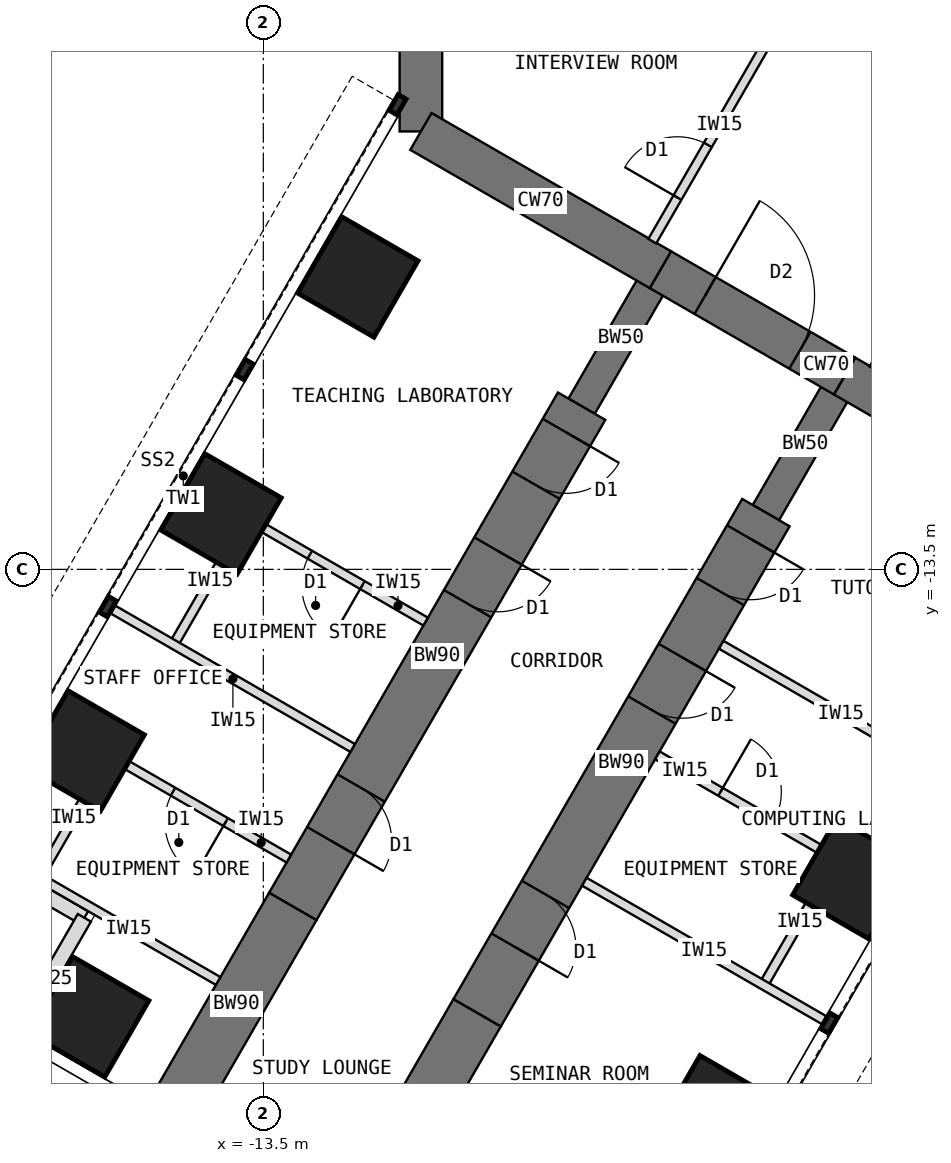
"""IFC4 building model, lengths in metres.
Left out: names, types, materials, properties, quantities, classifications, styles, units other than length and angle.
Written with IfcOpenShell. Run it as: python <this file> out.ifc"""

import sys

from ifc_helpers import new_model, si_unit, direction, frame, frame_2d, origin, origin_2d, place, context, subcontext, project, spatial, rectangle, extrude, element, fill, save


model = new_model("IFC4")
c1 = context("Model", 3, precision=1e-05, world=origin(), true_north=direction((0.0, 1.0)))
c2 = subcontext(c1, "Body", "Model", "MODEL_VIEW")
j1 = project(units=[si_unit("LENGTHUNIT", "METRE"), si_unit("PLANEANGLEUNIT", "RADIAN")], contexts=[c1])
p1 = place(None, origin())
s1 = spatial("IfcSite", under=j1, at=p1, CompositionType="ELEMENT")
p2 = place(p1, origin())
s2 = spatial("IfcBuilding", under=s1, at=p2, CompositionType="ELEMENT")
p3 = place(p2, frame((0.0, 0.0, 60.5)))
s3 = spatial("IfcBuildingStorey", under=s2, at=p3, CompositionType="ELEMENT", Elevation=60.5)
p4 = place(p3, frame((-10.908, 6.298, 0.0), z_axis=(0.0, 0.0, 1.0), x_axis=(0.0, -1.0, 0.0)))
e1 = element("IfcWall", 1, at=p4, inside=s3, PredefinedType="SHEAR", context=c2, shape_type="SweptSolid", body=[
    extrude(rectangle(XDim=12.596, YDim=0.7, at=frame_2d((6.298, 0.0))), origin(), (0.0, 0.0, 1.0), 4.0),
])
p5 = place(p3, frame((-10.908, -6.298, 0.0), z_axis=(0.0, 0.0, 1.0), x_axis=(0.866034513004, -0.499984222037, 0.0)))
e2 = element("IfcWall", 2, at=p5, inside=s3, PredefinedType="SHEAR", context=c2, shape_type="SweptSolid", body=[
    extrude(rectangle(XDim=4.548, YDim=0.7, at=frame_2d((2.274, 0.0))), origin(), (0.0, 0.0, 1.0), 4.0),
])
p6 = place(p3, frame((-6.97, -8.572, 0.0), z_axis=(0.0, 0.0, 1.0), x_axis=(0.866019471182, -0.500010275428, 0.0)))
e3 = element("IfcWall", 3, at=p6, inside=s3, PredefinedType="SHEAR", context=c2, shape_type="SweptSolid", body=[
    extrude(rectangle(XDim=3.5, YDim=0.7, at=frame_2d((1.75, 0.0))), origin(), (0.0, 0.0, 1.0), 4.0),
])
p7 = place(p6, frame((0.85, 0.0, 0.0)))
e4 = element("IfcOpeningElement", 4, at=p7, cuts=e3, PredefinedType="OPENING", context=c2, shape_type="SweptSolid", body=[
    extrude(rectangle(XDim=1.8, YDim=2.1, at=frame_2d((0.9, 1.05))), frame((0.0, 0.36, 0.0), z_axis=(0.0, -1.0, 0.0), x_axis=(1.0, 0.0, 0.0)), (0.0, 0.0, 1.0), 0.72),
])
p8 = place(p3, frame((-3.939, -10.322, 0.0), z_axis=(0.0, 0.0, 1.0), x_axis=(0.866011268655, -0.500024481964, 0.0)))
e5 = element("IfcWall", 5, at=p8, inside=s3, PredefinedType="SHEAR", context=c2, shape_type="SweptSolid", body=[
    extrude(rectangle(XDim=4.548, YDim=0.7, at=frame_2d((2.274, 0.0))), origin(), (0.0, 0.0, 1.0), 4.0),
])
p9 = place(p3, frame((-3.939, -10.322, 0.0), z_axis=(0.0, 0.0, 1.0), x_axis=(-0.499918158782, -0.866072649678, 0.0)))
e6 = element("IfcWall", 6, at=p9, inside=s3, PredefinedType="SHEAR", context=c2, shape_type="SweptSolid", body=[
    extrude(rectangle(XDim=2.592, YDim=0.5, at=frame_2d((1.296, 0.0))), origin(), (0.0, 0.0, 1.0), 4.0),
])
p10 = place(p3, frame((-5.234, -12.566, 0.0), z_axis=(0.0, 0.0, 1.0), x_axis=(-0.499997557548, -0.86602681393, 0.0)))
e7 = element("IfcWall", 7, at=p10, inside=s3, PredefinedType="SHEAR", context=c2, shape_type="SweptSolid", body=[
    extrude(rectangle(XDim=9.5, YDim=0.9, at=frame_2d((4.75, 0.0))), origin(), (0.0, 0.0, 1.0), 4.0),
])
p11 = place(p10, frame((0.5, 0.0, 0.0)))
e8 = element("IfcOpeningElement", 8, at=p11, cuts=e7, PredefinedType="OPENING", context=c2, shape_type="SweptSolid", body=[
    extrude(rectangle(XDim=1.0, YDim=2.1, at=frame_2d((0.5, 1.05))), frame((0.0, 0.46, 0.0), z_axis=(0.0, -1.0, 0.0), x_axis=(1.0, 0.0, 0.0)), (0.0, 0.0, 1.0), 0.92),
])
p12 = place(p10, frame((2.75, 0.0, 0.0)))
e9 = element("IfcOpeningElement", 9, at=p12, cuts=e7, PredefinedType="OPENING", context=c2, shape_type="SweptSolid", body=[
    extrude(rectangle(XDim=1.0, YDim=2.1, at=frame_2d((0.5, 1.05))), frame((0.0, 0.46, 0.0), z_axis=(0.0, -1.0, 0.0), x_axis=(1.0, 0.0, 0.0)), (0.0, 0.0, 1.0), 0.92),
])
p13 = place(p10, frame((7.25, 0.0, 0.0)))
e10 = element("IfcOpeningElement", 10, at=p13, cuts=e7, PredefinedType="OPENING", context=c2, shape_type="SweptSolid", body=[
    extrude(rectangle(XDim=1.0, YDim=2.1, at=frame_2d((0.5, 1.05))), frame((0.0, 0.46, 0.0), z_axis=(0.0, -1.0, 0.0), x_axis=(1.0, 0.0, 0.0)), (0.0, 0.0, 1.0), 0.92),
])
p14 = place(p3, frame((-9.984, -20.794, 0.0), z_axis=(0.0, 0.0, 1.0), x_axis=(-0.500042316284, -0.866000971088, 0.0)))
e11 = element("IfcWall", 11, at=p14, inside=s3, PredefinedType="SHEAR", context=c2, shape_type="SweptSolid", body=[
    extrude(rectangle(XDim=3.7, YDim=0.9, at=frame_2d((1.85, 0.0))), origin(), (0.0, 0.0, 1.0), 4.0),
])
p15 = place(p3, frame((-6.97, -8.572, 0.0), z_axis=(0.0, 0.0, 1.0), x_axis=(-0.499988811324, -0.866031863473, 0.0)))
e12 = element("IfcWall", 12, at=p15, inside=s3, PredefinedType="SHEAR", context=c2, shape_type="SweptSolid", body=[
    extrude(rectangle(XDim=2.592, YDim=0.5, at=frame_2d((1.296, 0.0))), origin(), (0.0, 0.0, 1.0), 4.0),
])
p16 = place(p3, frame((-8.266, -10.816, 0.0), z_axis=(0.0, 0.0, 1.0), x_axis=(-0.499997557548, -0.86602681393, 0.0)))
e13 = element("IfcWall", 13, at=p16, inside=s3, PredefinedType="SHEAR", context=c2, shape_type="SweptSolid", body=[
    extrude(rectangle(XDim=9.5, YDim=0.9, at=frame_2d((4.75, 0.0))), origin(), (0.0, 0.0, 1.0), 4.0),
])
p17 = place(p16, frame((0.5, 0.0, 0.0)))
e14 = element("IfcOpeningElement", 14, at=p17, cuts=e13, PredefinedType="OPENING", context=c2, shape_type="SweptSolid", body=[
    extrude(rectangle(XDim=1.0, YDim=2.1, at=frame_2d((0.5, 1.05))), frame((0.0, 0.46, 0.0), z_axis=(0.0, -1.0, 0.0), x_axis=(1.0, 0.0, 0.0)), (0.0, 0.0, 1.0), 0.92),
])
p18 = place(p16, frame((2.75, 0.0, 0.0)))
e15 = element("IfcOpeningElement", 15, at=p18, cuts=e13, PredefinedType="OPENING", context=c2, shape_type="SweptSolid", body=[
    extrude(rectangle(XDim=1.0, YDim=2.1, at=frame_2d((0.5, 1.05))), frame((0.0, 0.46, 0.0), z_axis=(0.0, -1.0, 0.0), x_axis=(1.0, 0.0, 0.0)), (0.0, 0.0, 1.0), 0.92),
])
p19 = place(p16, frame((7.25, 0.0, 0.0)))
e16 = element("IfcOpeningElement", 16, at=p19, cuts=e13, PredefinedType="OPENING", context=c2, shape_type="SweptSolid", body=[
    extrude(rectangle(XDim=1.0, YDim=2.1, at=frame_2d((0.5, 1.05))), frame((0.0, 0.46, 0.0), z_axis=(0.0, -1.0, 0.0), x_axis=(1.0, 0.0, 0.0)), (0.0, 0.0, 1.0), 0.92),
])
p20 = place(p3, frame((-13.016, -19.044, 0.0), z_axis=(0.0, 0.0, 1.0), x_axis=(-0.499992827086, -0.866029545028, 0.0)))
e17 = element("IfcWall", 17, at=p20, inside=s3, PredefinedType="SHEAR", context=c2, shape_type="SweptSolid", body=[
    extrude(rectangle(XDim=3.7, YDim=0.9, at=frame_2d((1.85, 0.0))), origin(), (0.0, 0.0, 1.0), 4.0),
])
for number, where, z_axis, x_axis in (
    (18, (-11.946, -8.691, 0.0), (0.0, 0.0, 1.0), (0.5, 0.866, 0.0)),
    (19, (-3.804, -18.588, 0.0), (0.0, 0.0, 1.0), (0.5, 0.866, 0.0)),
    (20, (-14.196, -12.588, 0.0), (0.0, 0.0, 1.0), (0.5, 0.866, 0.0)),
    (21, (-6.054, -22.486, 0.0), (0.0, 0.0, 1.0), (0.5, 0.866, 0.0)),
    (22, (-16.446, -16.486, 0.0), (0.0, 0.0, 1.0), (0.5, 0.866, 0.0)),
    (23, (-16.373, -20.858, 0.0), (0.0, 0.0, 1.0), (0.5, 0.866, 0.0)),
):
    element("IfcColumn", number, at=place(p3, frame(where, z_axis=z_axis, x_axis=x_axis)), inside=s3, PredefinedType="COLUMN", context=c2, shape_type="SweptSolid", body=[
        extrude(rectangle(XDim=1.45, YDim=1.45, at=origin_2d()), origin(), (0.0, 0.0, 1.0), 4.0),
    ])
for number, where, z_axis, x_axis in (
    (24, (-18.456, -18.067, 0.0), (0.0, 0.0, 1.0), (0.866, -0.5, 0.0)),
    (25, (-16.443, -19.23, 0.0), (0.0, 0.0, 1.0), (-0.5, -0.866, 0.0)),
):
    element("IfcWall", number, at=place(p3, frame(where, z_axis=z_axis, x_axis=x_axis)), inside=s3, PredefinedType="STANDARD", context=c2, shape_type="SweptSolid", body=[
        extrude(rectangle(XDim=2.325, YDim=0.25, at=frame_2d((1.163, 0.0))), origin(), (0.0, 0.0, 1.0), 3.8),
    ])
for number, where, z_axis, x_axis in (
    (26, (-5.97, -14.74, 0.0), (0.0, 0.0, 1.0), (0.866, -0.5, 0.0)),
    (27, (-8.22, -18.637, 0.0), (0.0, 0.0, 1.0), (0.866, -0.5, 0.0)),
):
    element("IfcWall", number, at=place(p3, frame(where, z_axis=z_axis, x_axis=x_axis)), inside=s3, PredefinedType="PARTITIONING", context=c2, shape_type="SweptSolid", body=[
        extrude(rectangle(XDim=4.55, YDim=0.15, at=frame_2d((2.275, 0.0))), origin(), (0.0, 0.0, 1.0), 3.8),
    ])
p21 = place(p3, frame((-4.075, -18.259, 0.0), z_axis=(0.0, 0.0, 1.0), x_axis=(-0.500001309137, -0.866024647952, 0.0)))
e28 = element("IfcWall", 28, at=p21, inside=s3, PredefinedType="PARTITIONING", context=c2, shape_type="SweptSolid", body=[
    extrude(rectangle(XDim=2.4, YDim=0.15, at=frame_2d((1.2, 0.0))), origin(), (0.0, 0.0, 1.0), 3.8),
])
p22 = place(p3, frame((-7.02, -16.559, 0.0), z_axis=(0.0, 0.0, 1.0), x_axis=(0.866038511948, -0.499977295307, 0.0)))
e29 = element("IfcWall", 29, at=p22, inside=s3, PredefinedType="PARTITIONING", context=c2, shape_type="SweptSolid", body=[
    extrude(rectangle(XDim=3.4, YDim=0.15, at=frame_2d((1.7, 0.0))), origin(), (0.0, 0.0, 1.0), 3.8),
])
p23 = place(p22, frame((1.2, 0.0, 0.0)))
e30 = element("IfcOpeningElement", 30, at=p23, cuts=e29, PredefinedType="OPENING", context=c2, shape_type="SweptSolid", body=[
    extrude(rectangle(XDim=1.0, YDim=2.1, at=frame_2d((0.5, 1.05))), frame((0.0, 0.085, 0.0), z_axis=(0.0, -1.0, 0.0), x_axis=(1.0, 0.0, 0.0)), (0.0, 0.0, 1.0), 0.17),
])
p24 = place(p3, frame((-12.03, -16.437, 0.0), z_axis=(0.0, 0.0, 1.0), x_axis=(-0.866035472144, 0.499982560684, 0.0)))
e31 = element("IfcWall", 31, at=p24, inside=s3, PredefinedType="PARTITIONING", context=c2, shape_type="SweptSolid", body=[
    extrude(rectangle(XDim=4.55, YDim=0.15, at=frame_2d((2.275, 0.0))), origin(), (0.0, 0.0, 1.0), 3.8),
])
p25 = place(p3, frame((-13.775, -12.658, 0.0), z_axis=(0.0, 0.0, 1.0), x_axis=(-0.500033551112, -0.866006032174, 0.0)))
e32 = element("IfcWall", 32, at=p25, inside=s3, PredefinedType="PARTITIONING", context=c2, shape_type="SweptSolid", body=[
    extrude(rectangle(XDim=2.4, YDim=0.15, at=frame_2d((1.2, 0.0))), origin(), (0.0, 0.0, 1.0), 3.8),
])
p26 = place(p3, frame((-10.83, -14.359, 0.0), z_axis=(0.0, 0.0, 1.0), x_axis=(-0.865989465428, 0.500062241894, 0.0)))
e33 = element("IfcWall", 33, at=p26, inside=s3, PredefinedType="PARTITIONING", context=c2, shape_type="SweptSolid", body=[
    extrude(rectangle(XDim=3.4, YDim=0.15, at=frame_2d((1.7, 0.0))), origin(), (0.0, 0.0, 1.0), 3.8),
])
p27 = place(p26, frame((1.2, 0.0, 0.0)))
e34 = element("IfcOpeningElement", 34, at=p27, cuts=e33, PredefinedType="OPENING", context=c2, shape_type="SweptSolid", body=[
    extrude(rectangle(XDim=1.0, YDim=2.1, at=frame_2d((0.5, 1.05))), frame((0.0, 0.085, 0.0), z_axis=(0.0, -1.0, 0.0), x_axis=(1.0, 0.0, 0.0)), (0.0, 0.0, 1.0), 0.17),
])
p28 = place(p3, frame((-16.025, -16.556, 0.0), z_axis=(0.0, 0.0, 1.0), x_axis=(-0.500077600433, -0.865980596518, 0.0)))
e35 = element("IfcWall", 35, at=p28, inside=s3, PredefinedType="PARTITIONING", context=c2, shape_type="SweptSolid", body=[
    extrude(rectangle(XDim=2.4, YDim=0.15, at=frame_2d((1.2, 0.0))), origin(), (0.0, 0.0, 1.0), 3.8),
])
p29 = place(p3, frame((-13.08, -18.256, 0.0), z_axis=(0.0, 0.0, 1.0), x_axis=(-0.866020560687, 0.500008388397, 0.0)))
e36 = element("IfcWall", 36, at=p29, inside=s3, PredefinedType="PARTITIONING", context=c2, shape_type="SweptSolid", body=[
    extrude(rectangle(XDim=3.4, YDim=0.15, at=frame_2d((1.7, 0.0))), origin(), (0.0, 0.0, 1.0), 3.8),
])
p30 = place(p29, frame((1.2, 0.0, 0.0)))
e37 = element("IfcOpeningElement", 37, at=p30, cuts=e36, PredefinedType="OPENING", context=c2, shape_type="SweptSolid", body=[
    extrude(rectangle(XDim=1.0, YDim=2.1, at=frame_2d((0.5, 1.05))), frame((0.0, 0.085, 0.0), z_axis=(0.0, -1.0, 0.0), x_axis=(1.0, 0.0, 0.0)), (0.0, 0.0, 1.0), 0.17),
])
p31 = place(p3, frame((-14.243, -20.269, 0.0), z_axis=(0.0, 0.0, 1.0), x_axis=(-0.866007419912, 0.500031147688, 0.0)))
e38 = element("IfcWall", 38, at=p31, inside=s3, PredefinedType="PARTITIONING", context=c2, shape_type="SweptSolid", body=[
    extrude(rectangle(XDim=3.4, YDim=0.15, at=frame_2d((1.7, 0.0))), origin(), (0.0, 0.0, 1.0), 3.8),
])
p32 = place(p3, frame((-1.253, -6.37, 0.0), z_axis=(0.0, 0.0, 1.0), x_axis=(-0.500007369519, -0.866021148949, 0.0)))
e39 = element("IfcWall", 39, at=p32, inside=s3, PredefinedType="PARTITIONING", context=c2, shape_type="SweptSolid", body=[
    extrude(rectangle(XDim=4.426, YDim=0.15, at=frame_2d((2.213, 0.0))), origin(), (0.0, 0.0, 1.0), 3.8),
])
p33 = place(p32, frame((2.598, 0.0, 0.0)))
e40 = element("IfcOpeningElement", 40, at=p33, cuts=e39, PredefinedType="OPENING", context=c2, shape_type="SweptSolid", body=[
    extrude(rectangle(XDim=1.0, YDim=2.1, at=frame_2d((0.5, 1.05))), frame((0.0, 0.085, 0.0), z_axis=(0.0, -1.0, 0.0), x_axis=(1.0, 0.0, 0.0)), (0.0, 0.0, 1.0), 0.17),
])
p34 = place(p3, frame((-7.103, -8.103, 0.0), z_axis=(0.0, 0.0, 1.0), x_axis=(0.500007369519, 0.866021148949, 0.0)))
e41 = element("IfcWall", 41, at=p34, inside=s3, PredefinedType="PARTITIONING", context=c2, shape_type="SweptSolid", body=[
    extrude(rectangle(XDim=4.426, YDim=0.15, at=frame_2d((2.213, 0.0))), origin(), (0.0, 0.0, 1.0), 3.8),
])
p35 = place(p34, frame((0.828, 0.0, 0.0)))
e42 = element("IfcOpeningElement", 42, at=p35, cuts=e41, PredefinedType="OPENING", context=c2, shape_type="SweptSolid", body=[
    extrude(rectangle(XDim=1.0, YDim=2.1, at=frame_2d((0.5, 1.05))), frame((0.0, 0.085, 0.0), z_axis=(0.0, -1.0, 0.0), x_axis=(1.0, 0.0, 0.0)), (0.0, 0.0, 1.0), 0.17),
])
p36 = place(p7, origin())
e43 = element("IfcDoor", 43, at=p36, inside=s3, OperationType="DOUBLE_DOOR_DOUBLE_SWING", PredefinedType="DOOR", context=c2, shape_type="SweptSolid", body=[
    extrude(rectangle(XDim=1.72, YDim=2.06, at=frame_2d((0.9, 1.03))), frame((0.0, 0.025, 0.0), z_axis=(0.0, -1.0, 0.0), x_axis=(1.0, 0.0, 0.0)), (0.0, 0.0, 1.0), 0.05),
    extrude(rectangle(XDim=0.04, YDim=2.1, at=frame_2d((0.02, 1.05))), frame((0.0, 0.35, 0.0), z_axis=(0.0, -1.0, 0.0), x_axis=(1.0, 0.0, 0.0)), (0.0, 0.0, 1.0), 0.699),
    extrude(rectangle(XDim=0.04, YDim=2.1, at=frame_2d((1.78, 1.05))), frame((0.0, 0.35, 0.0), z_axis=(0.0, -1.0, 0.0), x_axis=(1.0, 0.0, 0.0)), (0.0, 0.0, 1.0), 0.699),
    extrude(rectangle(XDim=1.72, YDim=0.04, at=frame_2d((0.9, 2.08))), frame((0.0, 0.35, 0.0), z_axis=(0.0, -1.0, 0.0), x_axis=(1.0, 0.0, 0.0)), (0.0, 0.0, 1.0), 0.699),
])
fill(e4, e43)
p37 = place(p23, origin())
e44 = element("IfcDoor", 44, at=p37, inside=s3, OperationType="SINGLE_SWING_LEFT", PredefinedType="DOOR", context=c2, shape_type="SweptSolid", body=[
    extrude(rectangle(XDim=1.0, YDim=2.1, at=frame_2d((0.5, 1.05))), frame((0.0, 0.025, 0.0), z_axis=(0.0, -1.0, 0.0), x_axis=(1.0, 0.0, 0.0)), (0.0, 0.0, 1.0), 0.05),
])
fill(e30, e44)
p38 = place(p27, origin())
e45 = element("IfcDoor", 45, at=p38, inside=s3, OperationType="SINGLE_SWING_LEFT", PredefinedType="DOOR", context=c2, shape_type="SweptSolid", body=[
    extrude(rectangle(XDim=1.0, YDim=2.1, at=frame_2d((0.5, 1.05))), frame((0.0, 0.025, 0.0), z_axis=(0.0, -1.0, 0.0), x_axis=(1.0, 0.0, 0.0)), (0.0, 0.0, 1.0), 0.05),
])
fill(e34, e45)
p39 = place(p30, origin())
e46 = element("IfcDoor", 46, at=p39, inside=s3, OperationType="SINGLE_SWING_LEFT", PredefinedType="DOOR", context=c2, shape_type="SweptSolid", body=[
    extrude(rectangle(XDim=1.0, YDim=2.1, at=frame_2d((0.5, 1.05))), frame((0.0, 0.025, 0.0), z_axis=(0.0, -1.0, 0.0), x_axis=(1.0, 0.0, 0.0)), (0.0, 0.0, 1.0), 0.05),
])
fill(e37, e46)
p40 = place(p35, origin())
e47 = element("IfcDoor", 47, at=p40, inside=s3, OperationType="SINGLE_SWING_LEFT", PredefinedType="DOOR", context=c2, shape_type="SweptSolid", body=[
    extrude(rectangle(XDim=1.0, YDim=2.1, at=frame_2d((0.5, 1.05))), frame((0.0, 0.025, 0.0), z_axis=(0.0, -1.0, 0.0), x_axis=(1.0, 0.0, 0.0)), (0.0, 0.0, 1.0), 0.05),
])
fill(e42, e47)
p41 = place(p11, origin())
e48 = element("IfcDoor", 48, at=p41, inside=s3, OperationType="SINGLE_SWING_LEFT", PredefinedType="DOOR", context=c2, shape_type="SweptSolid", body=[
    extrude(rectangle(XDim=0.92, YDim=2.06, at=frame_2d((0.5, 1.03))), frame((0.0, 0.025, 0.0), z_axis=(0.0, -1.0, 0.0), x_axis=(1.0, 0.0, 0.0)), (0.0, 0.0, 1.0), 0.05),
    extrude(rectangle(XDim=0.04, YDim=2.1, at=frame_2d((0.02, 1.05))), frame((0.0, 0.45, 0.0), z_axis=(0.0, -1.0, 0.0), x_axis=(1.0, 0.0, 0.0)), (0.0, 0.0, 1.0), 0.899),
    extrude(rectangle(XDim=0.04, YDim=2.1, at=frame_2d((0.98, 1.05))), frame((0.0, 0.45, 0.0), z_axis=(0.0, -1.0, 0.0), x_axis=(1.0, 0.0, 0.0)), (0.0, 0.0, 1.0), 0.899),
    extrude(rectangle(XDim=0.92, YDim=0.04, at=frame_2d((0.5, 2.08))), frame((0.0, 0.45, 0.0), z_axis=(0.0, -1.0, 0.0), x_axis=(1.0, 0.0, 0.0)), (0.0, 0.0, 1.0), 0.899),
])
fill(e8, e48)
p42 = place(p12, origin())
e49 = element("IfcDoor", 49, at=p42, inside=s3, OperationType="SINGLE_SWING_LEFT", PredefinedType="DOOR", context=c2, shape_type="SweptSolid", body=[
    extrude(rectangle(XDim=0.92, YDim=2.06, at=frame_2d((0.5, 1.03))), frame((0.0, 0.025, 0.0), z_axis=(0.0, -1.0, 0.0), x_axis=(1.0, 0.0, 0.0)), (0.0, 0.0, 1.0), 0.05),
    extrude(rectangle(XDim=0.04, YDim=2.1, at=frame_2d((0.02, 1.05))), frame((0.0, 0.45, 0.0), z_axis=(0.0, -1.0, 0.0), x_axis=(1.0, 0.0, 0.0)), (0.0, 0.0, 1.0), 0.899),
    extrude(rectangle(XDim=0.04, YDim=2.1, at=frame_2d((0.98, 1.05))), frame((0.0, 0.45, 0.0), z_axis=(0.0, -1.0, 0.0), x_axis=(1.0, 0.0, 0.0)), (0.0, 0.0, 1.0), 0.899),
    extrude(rectangle(XDim=0.92, YDim=0.04, at=frame_2d((0.5, 2.08))), frame((0.0, 0.45, 0.0), z_axis=(0.0, -1.0, 0.0), x_axis=(1.0, 0.0, 0.0)), (0.0, 0.0, 1.0), 0.899),
])
fill(e9, e49)
p43 = place(p13, origin())
e50 = element("IfcDoor", 50, at=p43, inside=s3, OperationType="SINGLE_SWING_RIGHT", PredefinedType="DOOR", context=c2, shape_type="SweptSolid", body=[
    extrude(rectangle(XDim=0.92, YDim=2.06, at=frame_2d((0.5, 1.03))), frame((0.0, 0.025, 0.0), z_axis=(0.0, -1.0, 0.0), x_axis=(1.0, 0.0, 0.0)), (0.0, 0.0, 1.0), 0.05),
    extrude(rectangle(XDim=0.04, YDim=2.1, at=frame_2d((0.02, 1.05))), frame((0.0, 0.45, 0.0), z_axis=(0.0, -1.0, 0.0), x_axis=(1.0, 0.0, 0.0)), (0.0, 0.0, 1.0), 0.899),
    extrude(rectangle(XDim=0.04, YDim=2.1, at=frame_2d((0.98, 1.05))), frame((0.0, 0.45, 0.0), z_axis=(0.0, -1.0, 0.0), x_axis=(1.0, 0.0, 0.0)), (0.0, 0.0, 1.0), 0.899),
    extrude(rectangle(XDim=0.92, YDim=0.04, at=frame_2d((0.5, 2.08))), frame((0.0, 0.45, 0.0), z_axis=(0.0, -1.0, 0.0), x_axis=(1.0, 0.0, 0.0)), (0.0, 0.0, 1.0), 0.899),
])
fill(e10, e50)
p44 = place(p17, origin())
e51 = element("IfcDoor", 51, at=p44, inside=s3, OperationType="SINGLE_SWING_LEFT", PredefinedType="DOOR", context=c2, shape_type="SweptSolid", body=[
    extrude(rectangle(XDim=0.92, YDim=2.06, at=frame_2d((0.5, 1.03))), frame((0.0, 0.025, 0.0), z_axis=(0.0, -1.0, 0.0), x_axis=(1.0, 0.0, 0.0)), (0.0, 0.0, 1.0), 0.05),
    extrude(rectangle(XDim=0.04, YDim=2.1, at=frame_2d((0.02, 1.05))), frame((0.0, 0.45, 0.0), z_axis=(0.0, -1.0, 0.0), x_axis=(1.0, 0.0, 0.0)), (0.0, 0.0, 1.0), 0.899),
    extrude(rectangle(XDim=0.04, YDim=2.1, at=frame_2d((0.98, 1.05))), frame((0.0, 0.45, 0.0), z_axis=(0.0, -1.0, 0.0), x_axis=(1.0, 0.0, 0.0)), (0.0, 0.0, 1.0), 0.899),
    extrude(rectangle(XDim=0.92, YDim=0.04, at=frame_2d((0.5, 2.08))), frame((0.0, 0.45, 0.0), z_axis=(0.0, -1.0, 0.0), x_axis=(1.0, 0.0, 0.0)), (0.0, 0.0, 1.0), 0.899),
])
fill(e14, e51)
p45 = place(p18, origin())
e52 = element("IfcDoor", 52, at=p45, inside=s3, OperationType="SINGLE_SWING_LEFT", PredefinedType="DOOR", context=c2, shape_type="SweptSolid", body=[
    extrude(rectangle(XDim=0.92, YDim=2.06, at=frame_2d((0.5, 1.03))), frame((0.0, 0.025, 0.0), z_axis=(0.0, -1.0, 0.0), x_axis=(1.0, 0.0, 0.0)), (0.0, 0.0, 1.0), 0.05),
    extrude(rectangle(XDim=0.04, YDim=2.1, at=frame_2d((0.02, 1.05))), frame((0.0, 0.45, 0.0), z_axis=(0.0, -1.0, 0.0), x_axis=(1.0, 0.0, 0.0)), (0.0, 0.0, 1.0), 0.899),
    extrude(rectangle(XDim=0.04, YDim=2.1, at=frame_2d((0.98, 1.05))), frame((0.0, 0.45, 0.0), z_axis=(0.0, -1.0, 0.0), x_axis=(1.0, 0.0, 0.0)), (0.0, 0.0, 1.0), 0.899),
    extrude(rectangle(XDim=0.92, YDim=0.04, at=frame_2d((0.5, 2.08))), frame((0.0, 0.45, 0.0), z_axis=(0.0, -1.0, 0.0), x_axis=(1.0, 0.0, 0.0)), (0.0, 0.0, 1.0), 0.899),
])
fill(e15, e52)
p46 = place(p19, origin())
e53 = element("IfcDoor", 53, at=p46, inside=s3, OperationType="SINGLE_SWING_RIGHT", PredefinedType="DOOR", context=c2, shape_type="SweptSolid", body=[
    extrude(rectangle(XDim=0.92, YDim=2.06, at=frame_2d((0.5, 1.03))), frame((0.0, 0.025, 0.0), z_axis=(0.0, -1.0, 0.0), x_axis=(1.0, 0.0, 0.0)), (0.0, 0.0, 1.0), 0.05),
    extrude(rectangle(XDim=0.04, YDim=2.1, at=frame_2d((0.02, 1.05))), frame((0.0, 0.45, 0.0), z_axis=(0.0, -1.0, 0.0), x_axis=(1.0, 0.0, 0.0)), (0.0, 0.0, 1.0), 0.899),
    extrude(rectangle(XDim=0.04, YDim=2.1, at=frame_2d((0.98, 1.05))), frame((0.0, 0.45, 0.0), z_axis=(0.0, -1.0, 0.0), x_axis=(1.0, 0.0, 0.0)), (0.0, 0.0, 1.0), 0.899),
    extrude(rectangle(XDim=0.92, YDim=0.04, at=frame_2d((0.5, 2.08))), frame((0.0, 0.45, 0.0), z_axis=(0.0, -1.0, 0.0), x_axis=(1.0, 0.0, 0.0)), (0.0, 0.0, 1.0), 0.899),
])
fill(e16, e53)
save(model, sys.argv[1])
